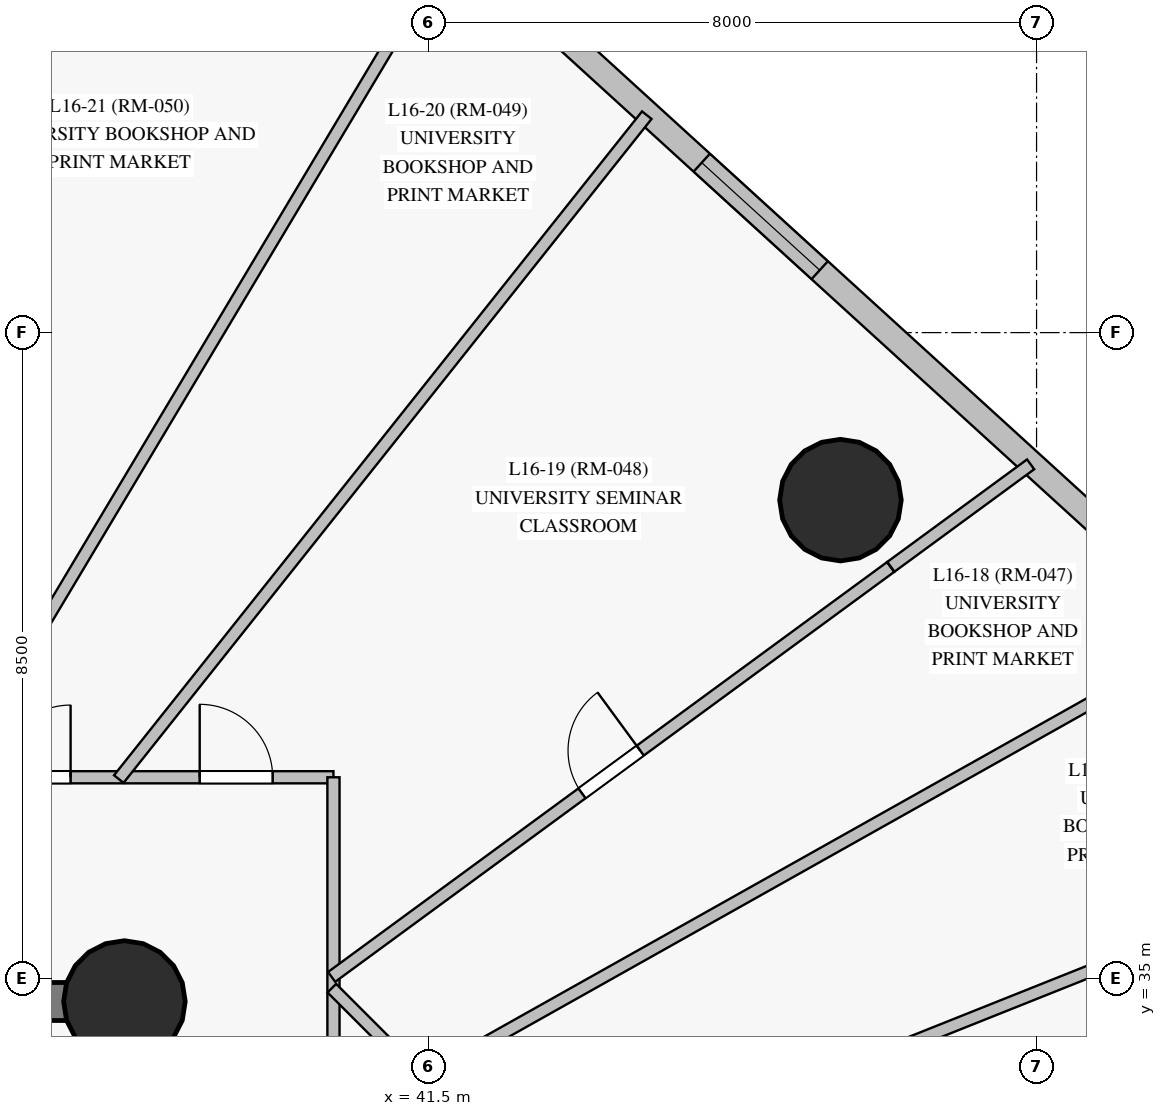
"""IFC4 building model, lengths in metres.
Left out: names, types, materials, properties, quantities, classifications, styles, units other than length and angle.
Written with IfcOpenShell. Run it as: python <this file> out.ifc"""

import sys

from ifc_helpers import new_model, si_unit, direction, frame, frame_2d, origin, origin_with_axes, origin_2d, place, context, subcontext, project, spatial, rectangle, circle, extrude, source, transform, mapped, element, fill, save


model = new_model("IFC4")
c1 = context("Model", 3, precision=1e-05, world=origin(), true_north=direction((0.0, 1.0)))
c2 = subcontext(c1, "Body", "Model", "MODEL_VIEW")
j1 = project(units=[si_unit("LENGTHUNIT", "METRE"), si_unit("PLANEANGLEUNIT", "RADIAN")], contexts=[c1])
p1 = place(None, origin())
s1 = spatial("IfcSite", under=j1, at=p1, CompositionType="ELEMENT")
p2 = place(p1, origin())
s2 = spatial("IfcBuilding", under=s1, at=p2, CompositionType="ELEMENT")
p3 = place(p2, frame((0.0, 0.0, 62.5)))
s3 = spatial("IfcBuildingStorey", under=s2, at=p3, CompositionType="ELEMENT", Elevation=62.5)
p4 = place(p3, frame((37.5, 18.3, 0.0), z_axis=(0.0, 0.0, 1.0), x_axis=(0.0, 1.0, 0.0)))
e1 = element("IfcWall", 1, at=p4, inside=s3, PredefinedType="SHEAR", context=c2, shape_type="SweptSolid", body=[
    extrude(rectangle(XDim=16.4, YDim=0.5, at=frame_2d((8.2, 0.0))), origin(), (0.0, 0.0, 1.0), 3.35),
])
p5 = place(p4, frame((14.06, 0.0, 0.0)))
e2 = element("IfcOpeningElement", 2, at=p5, cuts=e1, PredefinedType="OPENING", context=c2, shape_type="SweptSolid", body=[
    extrude(rectangle(XDim=1.2, YDim=2.15, at=frame_2d((0.6, 1.075))), frame((0.0, 0.26, 0.0), z_axis=(0.0, -1.0, 0.0), x_axis=(1.0, 0.0, 0.0)), (0.0, 0.0, 1.0), 0.52),
])
p6 = place(p3, frame((37.5, 34.7, 0.0), z_axis=(0.0, 0.0, 1.0), x_axis=(-1.0, 0.0, 0.0)))
e3 = element("IfcWall", 3, at=p6, inside=s3, PredefinedType="SHEAR", context=c2, shape_type="SweptSolid", body=[
    extrude(rectangle(XDim=10.95, YDim=0.5, at=frame_2d((5.475, 0.0))), origin(), (0.0, 0.0, 1.0), 3.35),
])
p7 = place(p6, frame((2.15, 0.0, 0.0)))
e4 = element("IfcOpeningElement", 4, at=p7, cuts=e3, PredefinedType="OPENING", context=c2, shape_type="SweptSolid", body=[
    extrude(rectangle(XDim=1.2, YDim=2.15, at=frame_2d((0.6, 1.075))), frame((0.0, 0.26, 0.0), z_axis=(0.0, -1.0, 0.0), x_axis=(1.0, 0.0, 0.0)), (0.0, 0.0, 1.0), 0.52),
])
p8 = place(p6, frame((6.35, 0.0, 0.0)))
e5 = element("IfcOpeningElement", 5, at=p8, cuts=e3, PredefinedType="OPENING", context=c2, shape_type="SweptSolid", body=[
    extrude(rectangle(XDim=1.1, YDim=2.15, at=frame_2d((0.55, 1.075))), frame((0.0, 0.26, 0.0), z_axis=(0.0, -1.0, 0.0), x_axis=(1.0, 0.0, 0.0)), (0.0, 0.0, 1.0), 0.52),
])
m1 = source(origin_with_axes(), c2, "Body", "SweptSolid", [
    extrude(circle(Radius=0.8, at=origin_2d()), origin(), (0.0, 0.0, 1.0), 3.6),
])
for number, where, z_axis, x_axis in (
    (6, (37.5, 34.7, 0.0), (0.0, 0.0, 1.0), (1.0, 0.0, 0.0)),
    (7, (46.92, 41.296, 0.0), (0.0, 0.0, 1.0), (1.0, 0.0, 0.0)),
):
    element("IfcColumn", number, at=place(p3, frame(where, z_axis=z_axis, x_axis=x_axis)), inside=s3, PredefinedType="COLUMN", context=c2, shape_type="MappedRepresentation", body=[
        mapped(m1, transform((0.0, 0.0, 0.0), scale=1.0)),
    ])
p9 = place(p3, frame((52.626, 38.872, 0.0), z_axis=(0.0, 0.0, 1.0), x_axis=(-0.739069015005, 0.673629713611, 0.0)))
e8 = element("IfcWall", 8, at=p9, inside=s3, PredefinedType="SOLIDWALL", context=c2, shape_type="SweptSolid", body=[
    extrude(rectangle(XDim=12.729, YDim=0.32, at=frame_2d((6.365, 0.0))), origin(), (0.0, 0.0, 1.0), 3.02),
])
p10 = place(p9, frame((1.622, 0.0, 0.85)))
e9 = element("IfcOpeningElement", 9, at=p10, cuts=e8, PredefinedType="OPENING", context=c2, shape_type="SweptSolid", body=[
    extrude(rectangle(XDim=1.5, YDim=1.85, at=frame_2d((0.75, 0.925))), frame((0.0, 0.17, 0.0), z_axis=(0.0, -1.0, 0.0), x_axis=(1.0, 0.0, 0.0)), (0.0, 0.0, 1.0), 0.34),
])
p11 = place(p9, frame((8.089, 0.0, 0.85)))
e10 = element("IfcOpeningElement", 10, at=p11, cuts=e8, PredefinedType="OPENING", context=c2, shape_type="SweptSolid", body=[
    extrude(rectangle(XDim=2.1, YDim=1.95, at=frame_2d((1.05, 0.975))), frame((0.0, 0.17, 0.0), z_axis=(0.0, -1.0, 0.0), x_axis=(1.0, 0.0, 0.0)), (0.0, 0.0, 1.0), 0.34),
])
p12 = place(p3, frame((10.5, 37.65, 0.0), z_axis=(0.0, 0.0, 1.0), x_axis=(1.0, 0.0, 0.0)))
e11 = element("IfcWall", 11, at=p12, inside=s3, PredefinedType="PARTITIONING", context=c2, shape_type="SweptSolid", body=[
    extrude(rectangle(XDim=29.75, YDim=0.16, at=frame_2d((14.875, 0.0))), origin(), (0.0, 0.0, 1.0), 2.75),
])
p13 = place(p12, frame((27.99, 0.0, 0.0)))
e12 = element("IfcOpeningElement", 12, at=p13, cuts=e11, PredefinedType="OPENING", context=c2, shape_type="SweptSolid", body=[
    extrude(rectangle(XDim=0.96, YDim=2.15, at=frame_2d((0.48, 1.075))), frame((0.0, 0.09, 0.0), z_axis=(0.0, -1.0, 0.0), x_axis=(1.0, 0.0, 0.0)), (0.0, 0.0, 1.0), 0.18),
])
p14 = place(p12, frame((25.342, 0.0, 0.0)))
e13 = element("IfcOpeningElement", 13, at=p14, cuts=e11, PredefinedType="OPENING", context=c2, shape_type="SweptSolid", body=[
    extrude(rectangle(XDim=0.95, YDim=2.15, at=frame_2d((0.475, 1.075))), frame((0.0, 0.09, 0.0), z_axis=(0.0, -1.0, 0.0), x_axis=(1.0, 0.0, 0.0)), (0.0, 0.0, 1.0), 0.18),
])
p15 = place(p12, frame((22.028, 0.0, 0.0)))
e14 = element("IfcOpeningElement", 14, at=p15, cuts=e11, PredefinedType="OPENING", context=c2, shape_type="SweptSolid", body=[
    extrude(rectangle(XDim=0.95, YDim=2.15, at=frame_2d((0.475, 1.075))), frame((0.0, 0.09, 0.0), z_axis=(0.0, -1.0, 0.0), x_axis=(1.0, 0.0, 0.0)), (0.0, 0.0, 1.0), 0.18),
])
p16 = place(p12, frame((20.31, 0.0, 0.0)))
e15 = element("IfcOpeningElement", 15, at=p16, cuts=e11, PredefinedType="OPENING", context=c2, shape_type="SweptSolid", body=[
    extrude(rectangle(XDim=0.96, YDim=2.15, at=frame_2d((0.48, 1.075))), frame((0.0, 0.09, 0.0), z_axis=(0.0, -1.0, 0.0), x_axis=(1.0, 0.0, 0.0)), (0.0, 0.0, 1.0), 0.18),
])
p17 = place(p12, frame((14.54, 0.0, 0.0)))
e16 = element("IfcOpeningElement", 16, at=p17, cuts=e11, PredefinedType="OPENING", context=c2, shape_type="SweptSolid", body=[
    extrude(rectangle(XDim=0.95, YDim=2.15, at=frame_2d((0.475, 1.075))), frame((0.0, 0.09, 0.0), z_axis=(0.0, -1.0, 0.0), x_axis=(1.0, 0.0, 0.0)), (0.0, 0.0, 1.0), 0.18),
])
p18 = place(p12, frame((12.43, 0.0, 0.0)))
e17 = element("IfcOpeningElement", 17, at=p18, cuts=e11, PredefinedType="OPENING", context=c2, shape_type="SweptSolid", body=[
    extrude(rectangle(XDim=0.96, YDim=2.15, at=frame_2d((0.48, 1.075))), frame((0.0, 0.09, 0.0), z_axis=(0.0, -1.0, 0.0), x_axis=(1.0, 0.0, 0.0)), (0.0, 0.0, 1.0), 0.18),
])
p19 = place(p12, frame((9.938, 0.0, 0.0)))
e18 = element("IfcOpeningElement", 18, at=p19, cuts=e11, PredefinedType="OPENING", context=c2, shape_type="SweptSolid", body=[
    extrude(rectangle(XDim=0.95, YDim=2.15, at=frame_2d((0.475, 1.075))), frame((0.0, 0.09, 0.0), z_axis=(0.0, -1.0, 0.0), x_axis=(1.0, 0.0, 0.0)), (0.0, 0.0, 1.0), 0.18),
])
p20 = place(p12, frame((6.962, 0.0, 0.0)))
e19 = element("IfcOpeningElement", 19, at=p20, cuts=e11, PredefinedType="OPENING", context=c2, shape_type="SweptSolid", body=[
    extrude(rectangle(XDim=0.95, YDim=2.15, at=frame_2d((0.475, 1.075))), frame((0.0, 0.09, 0.0), z_axis=(0.0, -1.0, 0.0), x_axis=(1.0, 0.0, 0.0)), (0.0, 0.0, 1.0), 0.18),
])
p21 = place(p3, frame((40.25, 37.65, 0.0), z_axis=(0.0, 0.0, 1.0), x_axis=(0.0, -1.0, 0.0)))
e20 = element("IfcWall", 20, at=p21, inside=s3, PredefinedType="PARTITIONING", context=c2, shape_type="SweptSolid", body=[
    extrude(rectangle(XDim=22.3, YDim=0.16, at=frame_2d((11.15, 0.0))), origin(), (0.0, 0.0, 1.0), 2.75),
])
p22 = place(p21, frame((16.25, 0.0, 0.0)))
e21 = element("IfcOpeningElement", 21, at=p22, cuts=e20, PredefinedType="OPENING", context=c2, shape_type="SweptSolid", body=[
    extrude(rectangle(XDim=0.95, YDim=2.15, at=frame_2d((0.475, 1.075))), frame((0.0, 0.09, 0.0), z_axis=(0.0, -1.0, 0.0), x_axis=(1.0, 0.0, 0.0)), (0.0, 0.0, 1.0), 0.18),
])
p23 = place(p21, frame((13.83, 0.0, 0.0)))
e22 = element("IfcOpeningElement", 22, at=p23, cuts=e20, PredefinedType="OPENING", context=c2, shape_type="SweptSolid", body=[
    extrude(rectangle(XDim=0.96, YDim=2.15, at=frame_2d((0.48, 1.075))), frame((0.0, 0.09, 0.0), z_axis=(0.0, -1.0, 0.0), x_axis=(1.0, 0.0, 0.0)), (0.0, 0.0, 1.0), 0.18),
])
p24 = place(p21, frame((10.385, 0.0, 0.0)))
e23 = element("IfcOpeningElement", 23, at=p24, cuts=e20, PredefinedType="OPENING", context=c2, shape_type="SweptSolid", body=[
    extrude(rectangle(XDim=0.95, YDim=2.15, at=frame_2d((0.475, 1.075))), frame((0.0, 0.09, 0.0), z_axis=(0.0, -1.0, 0.0), x_axis=(1.0, 0.0, 0.0)), (0.0, 0.0, 1.0), 0.18),
])
p25 = place(p3, frame((41.452, 33.706, 0.0), z_axis=(0.0, 0.0, 1.0), x_axis=(0.87188055056, 0.489718598335, 0.0)))
e24 = element("IfcWall", 24, at=p25, inside=s3, PredefinedType="PARTITIONING", context=c2, shape_type="SweptSolid", body=[
    extrude(rectangle(XDim=11.921, YDim=0.16, at=frame_2d((5.961, 0.0))), origin(), (0.0, 0.0, 1.0), 3.35),
])
p26 = place(p3, frame((35.215, 37.624, 0.0), z_axis=(0.0, 0.0, 1.0), x_axis=(0.512861528195, 0.858471346579, 0.0)))
e25 = element("IfcWall", 25, at=p26, inside=s3, PredefinedType="PARTITIONING", context=c2, shape_type="SweptSolid", body=[
    extrude(rectangle(XDim=11.914, YDim=0.16, at=frame_2d((5.957, 0.0))), origin(), (0.0, 0.0, 1.0), 3.35),
])
p27 = place(p3, frame((41.96, 31.809, 0.0), z_axis=(0.0, 0.0, 1.0), x_axis=(0.928727403057, 0.370763281368, 0.0)))
e26 = element("IfcWall", 26, at=p27, inside=s3, PredefinedType="PARTITIONING", context=c2, shape_type="SweptSolid", body=[
    extrude(rectangle(XDim=11.743, YDim=0.16, at=frame_2d((5.871, 0.0))), origin(), (0.0, 0.0, 1.0), 3.35),
])
p28 = place(p3, frame((37.426, 37.626, 0.0), z_axis=(0.0, 0.0, 1.0), x_axis=(0.62246479183, 0.782647802611, 0.0)))
e27 = element("IfcWall", 27, at=p28, inside=s3, PredefinedType="PARTITIONING", context=c2, shape_type="SweptSolid", body=[
    extrude(rectangle(XDim=11.16, YDim=0.16, at=frame_2d((5.58, 0.0))), origin(), (0.0, 0.0, 1.0), 3.35),
])
p29 = place(p3, frame((40.226, 35.023, 0.0), z_axis=(0.0, 0.0, 1.0), x_axis=(0.806433081641, 0.591325362922, 0.0)))
e28 = element("IfcWall", 28, at=p29, inside=s3, PredefinedType="PARTITIONING", context=c2, shape_type="SweptSolid", body=[
    extrude(rectangle(XDim=9.119, YDim=0.16, at=frame_2d((4.56, 0.0))), origin(), (0.0, 0.0, 1.0), 3.35),
])
p30 = place(p29, frame((4.085, 0.0, 0.0)))
e29 = element("IfcOpeningElement", 29, at=p30, cuts=e28, PredefinedType="OPENING", context=c2, shape_type="SweptSolid", body=[
    extrude(rectangle(XDim=0.95, YDim=2.15, at=frame_2d((0.475, 1.075))), frame((0.0, 0.09, 0.0), z_axis=(0.0, -1.0, 0.0), x_axis=(1.0, 0.0, 0.0)), (0.0, 0.0, 1.0), 0.18),
])
p31 = place(p3, frame((47.584, 40.419, 0.0), z_axis=(0.0, 0.0, 1.0), x_axis=(0.806418616354, 0.591345089772, 0.0)))
e30 = element("IfcWall", 30, at=p31, inside=s3, PredefinedType="PARTITIONING", context=c2, shape_type="SweptSolid", body=[
    extrude(rectangle(XDim=2.279, YDim=0.16, at=frame_2d((1.14, 0.0))), origin(), (0.0, 0.0, 1.0), 3.35),
])
p32 = place(p3, frame((40.229, 34.875, 0.0), z_axis=(0.0, 0.0, 1.0), x_axis=(0.707106781187, -0.707106781187, 0.0)))
e31 = element("IfcWall", 31, at=p32, inside=s3, PredefinedType="PARTITIONING", context=c2, shape_type="SweptSolid", body=[
    extrude(rectangle(XDim=1.438, YDim=0.16, at=frame_2d((0.719, 0.0))), origin(), (0.0, 0.0, 1.0), 3.35),
])
m2 = source(origin_with_axes(), c2, "Body", "SweptSolid", [
    extrude(rectangle(XDim=2.1, YDim=1.95, at=frame_2d((1.05, 0.975))), frame((0.0, 0.03, 0.0), z_axis=(0.0, -1.0, 0.0), x_axis=(1.0, 0.0, 0.0)), (0.0, 0.0, 1.0), 0.06),
])
p33 = place(p11, origin())
e32 = element("IfcWindow", 32, at=p33, inside=s3, PartitioningType="SINGLE_PANEL", PredefinedType="WINDOW", context=c2, shape_type="MappedRepresentation", body=[
    mapped(m2, transform((0.0, 0.0, 0.0), scale=1.0)),
])
fill(e10, e32)
m3 = source(origin_with_axes(), c2, "Body", "SweptSolid", [
    extrude(rectangle(XDim=0.96, YDim=2.15, at=frame_2d((0.48, 1.075))), frame((0.0, 0.025, 0.0), z_axis=(0.0, -1.0, 0.0), x_axis=(1.0, 0.0, 0.0)), (0.0, 0.0, 1.0), 0.05),
])
p34 = place(p13, origin())
e33 = element("IfcDoor", 33, at=p34, inside=s3, OperationType="SINGLE_SWING_LEFT", PredefinedType="DOOR", context=c2, shape_type="MappedRepresentation", body=[
    mapped(m3, transform((0.0, 0.0, 0.0), scale=1.0)),
])
fill(e12, e33)
m4 = source(origin_with_axes(), c2, "Body", "SweptSolid", [
    extrude(rectangle(XDim=0.95, YDim=2.15, at=frame_2d((0.475, 1.075))), frame((0.0, 0.025, 0.0), z_axis=(0.0, -1.0, 0.0), x_axis=(1.0, 0.0, 0.0)), (0.0, 0.0, 1.0), 0.05),
])
p35 = place(p14, origin())
e34 = element("IfcDoor", 34, at=p35, inside=s3, OperationType="SINGLE_SWING_RIGHT", PredefinedType="DOOR", context=c2, shape_type="MappedRepresentation", body=[
    mapped(m4, transform((0.0, 0.0, 0.0), scale=1.0)),
])
fill(e13, e34)
p36 = place(p30, origin())
e35 = element("IfcDoor", 35, at=p36, inside=s3, OperationType="SINGLE_SWING_RIGHT", PredefinedType="DOOR", context=c2, shape_type="MappedRepresentation", body=[
    mapped(m4, transform((0.0, 0.0, 0.0), scale=1.0)),
])
fill(e29, e35)
save(model, sys.argv[1])
